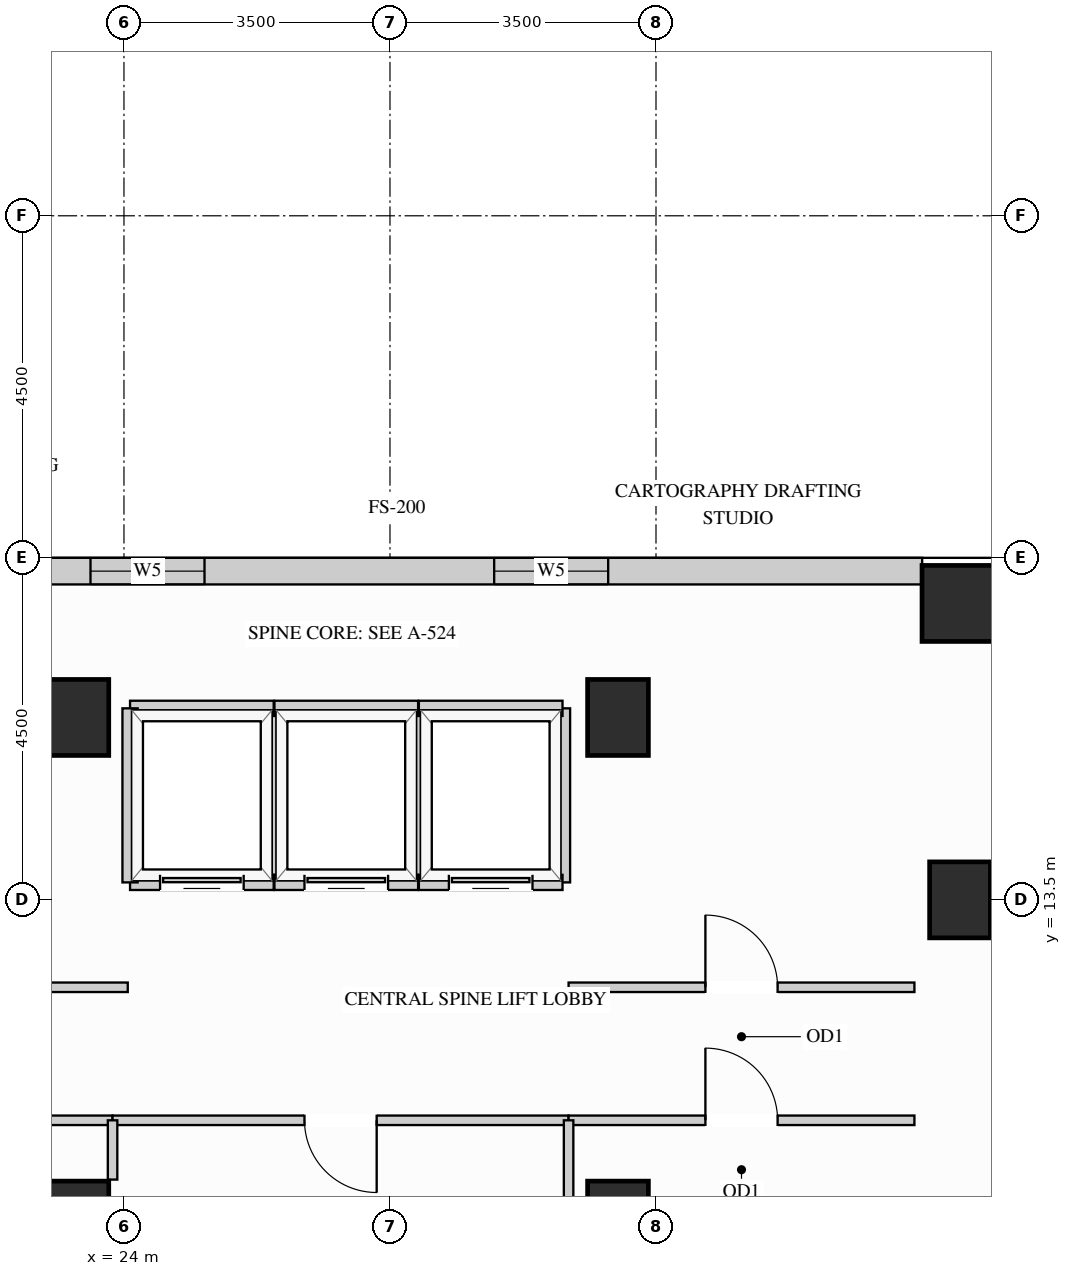
"""IFC4 building model, lengths in metres.
Left out: names, types, materials, properties, quantities, classifications, styles, units other than length and angle.
Written with IfcOpenShell. Run it as: python <this file> out.ifc"""

import sys

from ifc_helpers import new_model, si_unit, direction, frame, frame_2d, origin, origin_2d, place, context, subcontext, project, spatial, rectangle, extrude, source, transform, mapped, element, fill, save


model = new_model("IFC4")
c1 = context("Model", 3, precision=1e-05, world=origin(), true_north=direction((0.0, 1.0)))
c2 = subcontext(c1, "Body", "Model", "MODEL_VIEW")
j1 = project(units=[si_unit("LENGTHUNIT", "METRE"), si_unit("PLANEANGLEUNIT", "RADIAN")], contexts=[c1])
p1 = place(None, origin())
s1 = spatial("IfcSite", under=j1, at=p1, CompositionType="ELEMENT")
p2 = place(p1, origin())
s2 = spatial("IfcBuilding", under=s1, at=p2, CompositionType="ELEMENT")
p3 = place(p2, frame((0.0, 0.0, 175.5)))
s3 = spatial("IfcBuildingStorey", under=s2, at=p3, CompositionType="ELEMENT", Elevation=175.5)
m1 = source(origin(), c2, "Body", "SweptSolid", [
    extrude(rectangle(XDim=0.8, YDim=1.0, at=origin_2d()), origin(), (0.0, 0.0, 1.0), 3.4),
])
for number, where, z_axis, x_axis in (
    (1, (35.0, 13.5, 0.0), (0.0, 0.0, 1.0), (1.0, 0.0, 0.0)),
    (2, (23.4, 15.9, 0.0), (0.0, 0.0, 1.0), (1.0, 0.0, 0.0)),
    (3, (23.4, 9.3, 0.0), (0.0, 0.0, 1.0), (1.0, 0.0, 0.0)),
    (4, (30.5, 15.9, 0.0), (0.0, 0.0, 1.0), (1.0, 0.0, 0.0)),
    (5, (30.5, 9.3, 0.0), (0.0, 0.0, 1.0), (1.0, 0.0, 0.0)),
):
    element("IfcColumn", number, at=place(p3, frame(where, z_axis=z_axis, x_axis=x_axis)), inside=s3, PredefinedType="COLUMN", context=c2, shape_type="MappedRepresentation", body=[
        mapped(m1, transform((0.0, 0.0, 0.0), x_axis=(1.0, 0.0, 0.0), y_axis=(0.0, 1.0, 0.0), z_axis=(0.0, 0.0, 1.0))),
    ])
m2 = source(origin(), c2, "Body", "SweptSolid", [
    extrude(rectangle(XDim=1.0, YDim=1.0, at=origin_2d()), origin(), (0.0, 0.0, 1.0), 3.4),
])
p4 = place(p3, frame((35.0, 17.4, 0.0), z_axis=(0.0, 0.0, 1.0), x_axis=(1.0, 0.0, 0.0)))
e6 = element("IfcColumn", 6, at=p4, inside=s3, PredefinedType="COLUMN", context=c2, shape_type="MappedRepresentation", body=[
    mapped(m2, transform((0.0, 0.0, 0.0), x_axis=(1.0, 0.0, 0.0), y_axis=(0.0, 1.0, 0.0), z_axis=(0.0, 0.0, 1.0))),
])
p5 = place(p3, frame((34.502, 17.825, 0.0), z_axis=(0.0, 0.0, 1.0), x_axis=(-1.0, 0.0, 0.0)))
e7 = element("IfcWall", 7, at=p5, inside=s3, PredefinedType="SOLIDWALL", context=c2, shape_type="SweptSolid", body=[
    extrude(rectangle(XDim=15.104, YDim=0.35, at=frame_2d((7.552, 0.0))), origin(), (0.0, 0.0, 1.0), 3.385),
])
p6 = place(p5, frame((4.131, 0.0, 0.78)))
e8 = element("IfcOpeningElement", 8, at=p6, cuts=e7, PredefinedType="OPENING", context=c2, shape_type="SweptSolid", body=[
    extrude(rectangle(XDim=1.5, YDim=2.0, at=frame_2d((0.75, 1.0))), frame((0.0, 0.185, 0.0), z_axis=(0.0, -1.0, 0.0), x_axis=(1.0, 0.0, 0.0)), (0.0, 0.0, 1.0), 0.37),
])
p7 = place(p5, frame((9.442, 0.0, 0.78)))
e9 = element("IfcOpeningElement", 9, at=p7, cuts=e7, PredefinedType="OPENING", context=c2, shape_type="SweptSolid", body=[
    extrude(rectangle(XDim=1.5, YDim=2.0, at=frame_2d((0.75, 1.0))), frame((0.0, 0.185, 0.0), z_axis=(0.0, -1.0, 0.0), x_axis=(1.0, 0.0, 0.0)), (0.0, 0.0, 1.0), 0.37),
])
p8 = place(p3, frame((29.85, 12.35, 0.0), z_axis=(0.0, 0.0, 1.0), x_axis=(1.0, 0.0, 0.0)))
e10 = element("IfcWall", 10, at=p8, inside=s3, PredefinedType="PARTITIONING", context=c2, shape_type="SweptSolid", body=[
    extrude(rectangle(XDim=4.55, YDim=0.125, at=frame_2d((2.275, 0.0))), origin(), (0.0, 0.0, 1.0), 3.385),
])
p9 = place(p8, frame((1.8, 0.0, 0.0)))
e11 = element("IfcOpeningElement", 11, at=p9, cuts=e10, PredefinedType="OPENING", context=c2, shape_type="SweptSolid", body=[
    extrude(rectangle(XDim=0.95, YDim=2.15, at=frame_2d((0.475, 1.075))), frame((0.0, 0.073, 0.0), z_axis=(0.0, -1.0, 0.0), x_axis=(1.0, 0.0, 0.0)), (0.0, 0.0, 1.0), 0.145),
])
p10 = place(p3, frame((19.5, 12.35, 0.0), z_axis=(0.0, 0.0, 1.0), x_axis=(1.0, 0.0, 0.0)))
e12 = element("IfcWall", 12, at=p10, inside=s3, PredefinedType="PARTITIONING", context=c2, shape_type="SweptSolid", body=[
    extrude(rectangle(XDim=4.55, YDim=0.125, at=frame_2d((2.275, 0.0))), origin(), (0.0, 0.0, 1.0), 3.385),
])
p11 = place(p10, frame((1.8, 0.0, 0.0)))
e13 = element("IfcOpeningElement", 13, at=p11, cuts=e12, PredefinedType="OPENING", context=c2, shape_type="SweptSolid", body=[
    extrude(rectangle(XDim=0.95, YDim=2.15, at=frame_2d((0.475, 1.075))), frame((0.0, 0.073, 0.0), z_axis=(0.0, -1.0, 0.0), x_axis=(1.0, 0.0, 0.0)), (0.0, 0.0, 1.0), 0.145),
])
p12 = place(p3, frame((19.5, 10.6, 0.0), z_axis=(0.0, 0.0, 1.0), x_axis=(1.0, 0.0, 0.0)))
e14 = element("IfcWall", 14, at=p12, inside=s3, PredefinedType="PARTITIONING", context=c2, shape_type="SweptSolid", body=[
    extrude(rectangle(XDim=4.35, YDim=0.125, at=frame_2d((2.175, 0.0))), origin(), (0.0, 0.0, 1.0), 3.385),
])
p13 = place(p12, frame((1.7, 0.0, 0.0)))
e15 = element("IfcOpeningElement", 15, at=p13, cuts=e14, PredefinedType="OPENING", context=c2, shape_type="SweptSolid", body=[
    extrude(rectangle(XDim=0.95, YDim=2.15, at=frame_2d((0.475, 1.075))), frame((0.0, 0.073, 0.0), z_axis=(0.0, -1.0, 0.0), x_axis=(1.0, 0.0, 0.0)), (0.0, 0.0, 1.0), 0.145),
])
p14 = place(p3, frame((23.85, 10.6, 0.0), z_axis=(0.0, 0.0, 1.0), x_axis=(1.0, 0.0, 0.0)))
e16 = element("IfcWall", 16, at=p14, inside=s3, PredefinedType="PARTITIONING", context=c2, shape_type="SweptSolid", body=[
    extrude(rectangle(XDim=6.0, YDim=0.125, at=frame_2d((3.0, 0.0))), origin(), (0.0, 0.0, 1.0), 3.385),
])
p15 = place(p14, frame((2.525, 0.0, 0.0)))
e17 = element("IfcOpeningElement", 17, at=p15, cuts=e16, PredefinedType="OPENING", context=c2, shape_type="SweptSolid", body=[
    extrude(rectangle(XDim=0.95, YDim=2.15, at=frame_2d((0.475, 1.075))), frame((0.0, 0.073, 0.0), z_axis=(0.0, -1.0, 0.0), x_axis=(1.0, 0.0, 0.0)), (0.0, 0.0, 1.0), 0.145),
])
p16 = place(p3, frame((29.85, 10.6, 0.0), z_axis=(0.0, 0.0, 1.0), x_axis=(1.0, 0.0, 0.0)))
e18 = element("IfcWall", 18, at=p16, inside=s3, PredefinedType="PARTITIONING", context=c2, shape_type="SweptSolid", body=[
    extrude(rectangle(XDim=4.55, YDim=0.125, at=frame_2d((2.275, 0.0))), origin(), (0.0, 0.0, 1.0), 3.385),
])
p17 = place(p16, frame((1.8, 0.0, 0.0)))
e19 = element("IfcOpeningElement", 19, at=p17, cuts=e18, PredefinedType="OPENING", context=c2, shape_type="SweptSolid", body=[
    extrude(rectangle(XDim=0.95, YDim=2.15, at=frame_2d((0.475, 1.075))), frame((0.0, 0.073, 0.0), z_axis=(0.0, -1.0, 0.0), x_axis=(1.0, 0.0, 0.0)), (0.0, 0.0, 1.0), 0.145),
])
m3 = source(origin(), c2, "Body", "SweptSolid", [
    extrude(rectangle(XDim=0.78, YDim=0.125, at=frame_2d((0.39, 0.0))), origin(), (0.0, 0.0, 1.0), 3.385),
])
p18 = place(p3, frame((23.85, 9.82, 0.0), z_axis=(0.0, 0.0, 1.0), x_axis=(0.0, 1.0, 0.0)))
e20 = element("IfcWall", 20, at=p18, inside=s3, PredefinedType="PARTITIONING", context=c2, shape_type="MappedRepresentation", body=[
    mapped(m3, transform((0.0, 0.0, 0.0), x_axis=(1.0, 0.0, 0.0), y_axis=(0.0, 1.0, 0.0), z_axis=(0.0, 0.0, 1.0))),
])
m4 = source(origin(), c2, "Body", "SweptSolid", [
    extrude(rectangle(XDim=1.748, YDim=0.125, at=frame_2d((0.874, 0.0))), origin(), (0.0, 0.0, 1.0), 3.385),
])
p19 = place(p3, frame((29.85, 8.852, 0.0), z_axis=(0.0, 0.0, 1.0), x_axis=(0.0, 1.0, 0.0)))
e21 = element("IfcWall", 21, at=p19, inside=s3, PredefinedType="PARTITIONING", context=c2, shape_type="MappedRepresentation", body=[
    mapped(m4, transform((0.0, 0.0, 0.0), x_axis=(1.0, 0.0, 0.0), y_axis=(0.0, 1.0, 0.0), z_axis=(0.0, 0.0, 1.0))),
])
m5 = source(origin(), c2, "Body", "SweptSolid", [
    extrude(rectangle(XDim=2.29, YDim=0.2, at=frame_2d((1.145, 0.0))), origin(), (0.0, 0.0, 1.0), 3.385),
])
p20 = place(p3, frame((25.97, 13.73, 0.0), z_axis=(0.0, 0.0, 1.0), x_axis=(0.0, 1.0, 0.0)))
e22 = element("IfcWall", 22, at=p20, inside=s3, PredefinedType="PARTITIONING", context=c2, shape_type="MappedRepresentation", body=[
    mapped(m5, transform((0.0, 0.0, 0.0), x_axis=(1.0, 0.0, 0.0), y_axis=(0.0, 1.0, 0.0), z_axis=(0.0, 0.0, 1.0))),
])
m6 = source(origin(), c2, "Body", "SweptSolid", [
    extrude(rectangle(XDim=1.89, YDim=0.2, at=frame_2d((0.945, 0.0))), origin(), (0.0, 0.0, 1.0), 2.773),
])
p21 = place(p3, frame((24.08, 16.02, 0.0), z_axis=(0.0, 0.0, 1.0), x_axis=(1.0, 0.0, 0.0)))
e23 = element("IfcWall", 23, at=p21, inside=s3, PredefinedType="PARTITIONING", context=c2, shape_type="MappedRepresentation", body=[
    mapped(m6, transform((0.0, 0.0, 0.0), x_axis=(1.0, 0.0, 0.0), y_axis=(0.0, 1.0, 0.0), z_axis=(0.0, 0.0, 1.0))),
])
p22 = place(p3, frame((24.08, 13.73, 0.0), z_axis=(0.0, 0.0, 1.0), x_axis=(1.0, 0.0, 0.0)))
e24 = element("IfcWall", 24, at=p22, inside=s3, PredefinedType="PARTITIONING", context=c2, shape_type="SweptSolid", body=[
    extrude(rectangle(XDim=1.89, YDim=0.2, at=frame_2d((0.945, 0.0))), origin(), (0.0, 0.0, 1.0), 2.466),
])
p23 = place(p22, frame((0.395, 0.0, 0.0)))
e25 = element("IfcOpeningElement", 25, at=p23, cuts=e24, PredefinedType="OPENING", context=c2, shape_type="SweptSolid", body=[
    extrude(rectangle(XDim=1.1, YDim=2.2, at=frame_2d((0.55, 1.1))), frame((0.0, 0.11, 0.0), z_axis=(0.0, -1.0, 0.0), x_axis=(1.0, 0.0, 0.0)), (0.0, 0.0, 1.0), 0.22),
])
for number, where, z_axis, x_axis in (
    (26, (24.08, 13.73, 0.0), (0.0, 0.0, 1.0), (0.0, 1.0, 0.0)),
    (27, (27.87, 13.73, 0.0), (0.0, 0.0, 1.0), (0.0, 1.0, 0.0)),
):
    element("IfcWall", number, at=place(p3, frame(where, z_axis=z_axis, x_axis=x_axis)), inside=s3, PredefinedType="PARTITIONING", context=c2, shape_type="MappedRepresentation", body=[
        mapped(m5, transform((0.0, 0.0, 0.0), x_axis=(1.0, 0.0, 0.0), y_axis=(0.0, 1.0, 0.0), z_axis=(0.0, 0.0, 1.0))),
    ])
m7 = source(origin(), c2, "Body", "SweptSolid", [
    extrude(rectangle(XDim=1.89, YDim=0.2, at=frame_2d((0.945, 0.0))), origin(), (0.0, 0.0, 1.0), 2.773),
])
p24 = place(p3, frame((25.98, 16.02, 0.0), z_axis=(0.0, 0.0, 1.0), x_axis=(1.0, 0.0, 0.0)))
e28 = element("IfcWall", 28, at=p24, inside=s3, PredefinedType="PARTITIONING", context=c2, shape_type="MappedRepresentation", body=[
    mapped(m7, transform((0.0, 0.0, 0.0), x_axis=(1.0, 0.0, 0.0), y_axis=(0.0, 1.0, 0.0), z_axis=(0.0, 0.0, 1.0))),
])
p25 = place(p3, frame((25.98, 13.73, 0.0), z_axis=(0.0, 0.0, 1.0), x_axis=(1.0, 0.0, 0.0)))
e29 = element("IfcWall", 29, at=p25, inside=s3, PredefinedType="PARTITIONING", context=c2, shape_type="SweptSolid", body=[
    extrude(rectangle(XDim=1.89, YDim=0.2, at=frame_2d((0.945, 0.0))), origin(), (0.0, 0.0, 1.0), 2.466),
])
p26 = place(p25, frame((0.395, 0.0, 0.0)))
e30 = element("IfcOpeningElement", 30, at=p26, cuts=e29, PredefinedType="OPENING", context=c2, shape_type="SweptSolid", body=[
    extrude(rectangle(XDim=1.1, YDim=2.2, at=frame_2d((0.55, 1.1))), frame((0.0, 0.11, 0.0), z_axis=(0.0, -1.0, 0.0), x_axis=(1.0, 0.0, 0.0)), (0.0, 0.0, 1.0), 0.22),
])
p27 = place(p3, frame((29.77, 13.73, 0.0), z_axis=(0.0, 0.0, 1.0), x_axis=(0.0, 1.0, 0.0)))
e31 = element("IfcWall", 31, at=p27, inside=s3, PredefinedType="PARTITIONING", context=c2, shape_type="MappedRepresentation", body=[
    mapped(m5, transform((0.0, 0.0, 0.0), x_axis=(1.0, 0.0, 0.0), y_axis=(0.0, 1.0, 0.0), z_axis=(0.0, 0.0, 1.0))),
])
p28 = place(p3, frame((27.88, 16.02, 0.0), z_axis=(0.0, 0.0, 1.0), x_axis=(1.0, 0.0, 0.0)))
e32 = element("IfcWall", 32, at=p28, inside=s3, PredefinedType="PARTITIONING", context=c2, shape_type="MappedRepresentation", body=[
    mapped(m7, transform((0.0, 0.0, 0.0), x_axis=(1.0, 0.0, 0.0), y_axis=(0.0, 1.0, 0.0), z_axis=(0.0, 0.0, 1.0))),
])
p29 = place(p3, frame((27.88, 13.73, 0.0), z_axis=(0.0, 0.0, 1.0), x_axis=(1.0, 0.0, 0.0)))
e33 = element("IfcWall", 33, at=p29, inside=s3, PredefinedType="PARTITIONING", context=c2, shape_type="SweptSolid", body=[
    extrude(rectangle(XDim=1.89, YDim=0.2, at=frame_2d((0.945, 0.0))), origin(), (0.0, 0.0, 1.0), 2.466),
])
p30 = place(p29, frame((0.395, 0.0, 0.0)))
e34 = element("IfcOpeningElement", 34, at=p30, cuts=e33, PredefinedType="OPENING", context=c2, shape_type="SweptSolid", body=[
    extrude(rectangle(XDim=1.1, YDim=2.2, at=frame_2d((0.55, 1.1))), frame((0.0, 0.11, 0.0), z_axis=(0.0, -1.0, 0.0), x_axis=(1.0, 0.0, 0.0)), (0.0, 0.0, 1.0), 0.22),
])
m8 = source(origin(), c2, "Body", "SweptSolid", [
    extrude(rectangle(XDim=1.1, YDim=2.2, at=frame_2d((0.55, 1.1))), frame((0.0, 0.025, 0.0), z_axis=(0.0, -1.0, 0.0), x_axis=(1.0, 0.0, 0.0)), (0.0, 0.0, 1.0), 0.05),
])
p31 = place(p23, origin())
e35 = element("IfcDoor", 35, at=p31, inside=s3, OperationType="SLIDING_TO_LEFT", PredefinedType="DOOR", context=c2, shape_type="MappedRepresentation", body=[
    mapped(m8, transform((0.0, 0.0, 0.0), x_axis=(1.0, 0.0, 0.0), y_axis=(0.0, 1.0, 0.0), z_axis=(0.0, 0.0, 1.0))),
])
fill(e25, e35)
p32 = place(p26, origin())
e36 = element("IfcDoor", 36, at=p32, inside=s3, OperationType="SLIDING_TO_LEFT", PredefinedType="DOOR", context=c2, shape_type="MappedRepresentation", body=[
    mapped(m8, transform((0.0, 0.0, 0.0), x_axis=(1.0, 0.0, 0.0), y_axis=(0.0, 1.0, 0.0), z_axis=(0.0, 0.0, 1.0))),
])
fill(e30, e36)
p33 = place(p30, origin())
e37 = element("IfcDoor", 37, at=p33, inside=s3, OperationType="SLIDING_TO_LEFT", PredefinedType="DOOR", context=c2, shape_type="MappedRepresentation", body=[
    mapped(m8, transform((0.0, 0.0, 0.0), x_axis=(1.0, 0.0, 0.0), y_axis=(0.0, 1.0, 0.0), z_axis=(0.0, 0.0, 1.0))),
])
fill(e34, e37)
m9 = source(origin(), c2, "Body", "SweptSolid", [
    extrude(rectangle(XDim=0.95, YDim=2.15, at=frame_2d((0.475, 1.075))), frame((0.0, 0.025, 0.0), z_axis=(0.0, -1.0, 0.0), x_axis=(1.0, 0.0, 0.0)), (0.0, 0.0, 1.0), 0.05),
])
p34 = place(p9, origin())
e38 = element("IfcDoor", 38, at=p34, inside=s3, OperationType="SINGLE_SWING_LEFT", PredefinedType="DOOR", context=c2, shape_type="MappedRepresentation", body=[
    mapped(m9, transform((0.0, 0.0, 0.0), x_axis=(1.0, 0.0, 0.0), y_axis=(0.0, 1.0, 0.0), z_axis=(0.0, 0.0, 1.0))),
])
fill(e11, e38)
p35 = place(p15, origin())
e39 = element("IfcDoor", 39, at=p35, inside=s3, OperationType="SINGLE_SWING_RIGHT", PredefinedType="DOOR", context=c2, shape_type="MappedRepresentation", body=[
    mapped(m9, transform((0.0, 0.0, 0.0), x_axis=(1.0, 0.0, 0.0), y_axis=(0.0, 1.0, 0.0), z_axis=(0.0, 0.0, 1.0))),
])
fill(e17, e39)
p36 = place(p17, origin())
e40 = element("IfcDoor", 40, at=p36, inside=s3, OperationType="SINGLE_SWING_LEFT", PredefinedType="DOOR", context=c2, shape_type="MappedRepresentation", body=[
    mapped(m9, transform((0.0, 0.0, 0.0), x_axis=(1.0, 0.0, 0.0), y_axis=(0.0, 1.0, 0.0), z_axis=(0.0, 0.0, 1.0))),
])
fill(e19, e40)
m10 = source(origin(), c2, "Body", "SweptSolid", [
    extrude(rectangle(XDim=1.5, YDim=2.0, at=frame_2d((0.75, 1.0))), frame((0.0, 0.03, 0.0), z_axis=(0.0, -1.0, 0.0), x_axis=(1.0, 0.0, 0.0)), (0.0, 0.0, 1.0), 0.06),
])
p37 = place(p6, origin())
e41 = element("IfcWindow", 41, at=p37, inside=s3, PartitioningType="SINGLE_PANEL", PredefinedType="WINDOW", context=c2, shape_type="MappedRepresentation", body=[
    mapped(m10, transform((0.0, 0.0, 0.0), x_axis=(1.0, 0.0, 0.0), y_axis=(0.0, 1.0, 0.0), z_axis=(0.0, 0.0, 1.0))),
])
fill(e8, e41)
p38 = place(p7, origin())
e42 = element("IfcWindow", 42, at=p38, inside=s3, PartitioningType="SINGLE_PANEL", PredefinedType="WINDOW", context=c2, shape_type="MappedRepresentation", body=[
    mapped(m10, transform((0.0, 0.0, 0.0), x_axis=(1.0, 0.0, 0.0), y_axis=(0.0, 1.0, 0.0), z_axis=(0.0, 0.0, 1.0))),
])
fill(e9, e42)
save(model, sys.argv[1])
